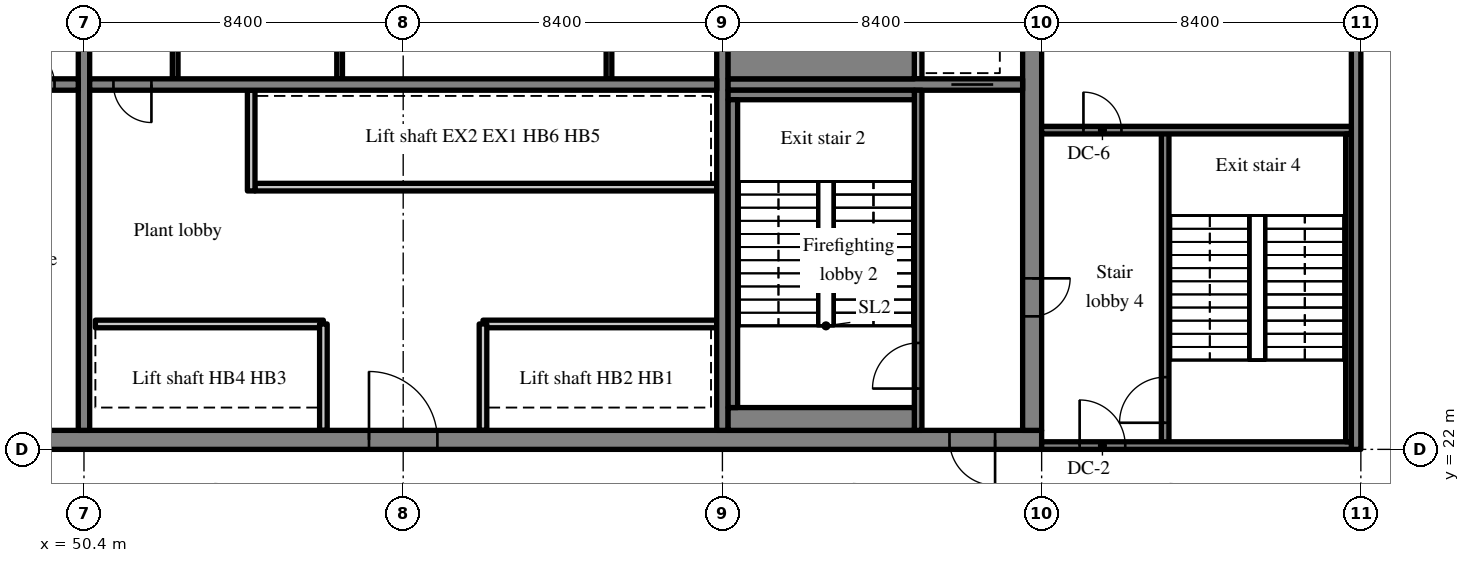
"""IFC4 building model, lengths in metres.
Left out: names, types, materials, properties, quantities, classifications, styles, units other than length and angle.
Written with IfcOpenShell. Run it as: python <this file> out.ifc"""

import sys

from ifc_helpers import new_model, si_unit, direction, frame, frame_2d, origin, place, context, subcontext, project, spatial, rectangle, extrude, source, transform, mapped, element, fill, save


model = new_model("IFC4")
c1 = context("Model", 3, precision=1e-05, world=origin(), true_north=direction((0.0, 1.0)))
c2 = subcontext(c1, "Body", "Model", "MODEL_VIEW")
j1 = project(units=[si_unit("LENGTHUNIT", "METRE"), si_unit("PLANEANGLEUNIT", "RADIAN")], contexts=[c1])
p1 = place(None, origin())
s1 = spatial("IfcSite", under=j1, at=p1, CompositionType="ELEMENT")
p2 = place(p1, origin())
s2 = spatial("IfcBuilding", under=s1, at=p2, CompositionType="ELEMENT")
p3 = place(p2, frame((0.0, 0.0, 270.1)))
s3 = spatial("IfcBuildingStorey", under=s2, at=p3, CompositionType="ELEMENT", Elevation=270.1)
m1 = source(origin(), c2, "Body", "SweptSolid", [
    extrude(rectangle(XDim=50.4, YDim=0.5, at=frame_2d((25.2, 0.0))), origin(), (0.0, 0.0, 1.0), 7.32),
])
p4 = place(p3, frame((25.2, 22.25, 0.0), z_axis=(0.0, 0.0, 1.0), x_axis=(1.0, 0.0, 0.0)))
e1 = element("IfcWall", 1, at=p4, inside=s3, PredefinedType="SHEAR", context=c2, shape_type="MappedRepresentation", body=[
    mapped(m1, transform((0.0, 0.0, 0.0), scale=1.0)),
])
m2 = source(origin(), c2, "Body", "SweptSolid", [
    extrude(rectangle(XDim=1.2, YDim=2.1, at=frame_2d((0.6, 1.05))), frame((0.0, 0.26, 0.0), z_axis=(0.0, -1.0, 0.0), x_axis=(1.0, 0.0, 0.0)), (0.0, 0.0, 1.0), 0.52),
])
p5 = place(p4, frame((22.275, 0.0, 0.0)))
e2 = element("IfcOpeningElement", 2, at=p5, cuts=e1, PredefinedType="OPENING", context=c2, shape_type="MappedRepresentation", body=[
    mapped(m2, transform((0.0, 0.0, 0.0), scale=1.0)),
])
m3 = source(origin(), c2, "Body", "SweptSolid", [
    extrude(rectangle(XDim=0.9, YDim=2.1, at=frame_2d((0.45, 1.05))), frame((0.0, 0.26, 0.0), z_axis=(0.0, -1.0, 0.0), x_axis=(1.0, 0.0, 0.0)), (0.0, 0.0, 1.0), 0.52),
])
p6 = place(p4, frame((15.75, 0.0, 0.0)))
e3 = element("IfcOpeningElement", 3, at=p6, cuts=e1, PredefinedType="OPENING", context=c2, shape_type="MappedRepresentation", body=[
    mapped(m3, transform((0.0, 0.0, 0.0), scale=1.0)),
])
p7 = place(p4, frame((18.75, 0.0, 0.0)))
e4 = element("IfcOpeningElement", 4, at=p7, cuts=e1, PredefinedType="OPENING", context=c2, shape_type="MappedRepresentation", body=[
    mapped(m3, transform((0.0, 0.0, 0.0), scale=1.0)),
])
p8 = place(p4, frame((11.175, 0.0, 0.0)))
e5 = element("IfcOpeningElement", 5, at=p8, cuts=e1, PredefinedType="OPENING", context=c2, shape_type="MappedRepresentation", body=[
    mapped(m3, transform((0.0, 0.0, 0.0), scale=1.0)),
])
m4 = source(origin(), c2, "Body", "SweptSolid", [
    extrude(rectangle(XDim=1.8, YDim=2.1, at=frame_2d((0.9, 1.05))), frame((0.0, 0.26, 0.0), z_axis=(0.0, -1.0, 0.0), x_axis=(1.0, 0.0, 0.0)), (0.0, 0.0, 1.0), 0.52),
])
p9 = place(p4, frame((32.7, 0.0, 0.0)))
e6 = element("IfcOpeningElement", 6, at=p9, cuts=e1, PredefinedType="OPENING", context=c2, shape_type="MappedRepresentation", body=[
    mapped(m4, transform((0.0, 0.0, 0.0), scale=1.0)),
])
p10 = place(p4, frame((6.5, 0.0, 0.0)))
e7 = element("IfcOpeningElement", 7, at=p10, cuts=e1, PredefinedType="OPENING", context=c2, shape_type="MappedRepresentation", body=[
    mapped(m2, transform((0.0, 0.0, 0.0), scale=1.0)),
])
p11 = place(p4, frame((47.975, 0.0, 0.0)))
e8 = element("IfcOpeningElement", 8, at=p11, cuts=e1, PredefinedType="OPENING", context=c2, shape_type="MappedRepresentation", body=[
    mapped(m2, transform((0.0, 0.0, 0.0), scale=1.0)),
])
m5 = source(origin(), c2, "Body", "SweptSolid", [
    extrude(rectangle(XDim=19.0, YDim=0.5, at=frame_2d((9.5, 0.0))), origin(), (0.0, 0.0, 1.0), 7.32),
])
p12 = place(p3, frame((75.35, 22.5, 0.0), z_axis=(0.0, 0.0, 1.0), x_axis=(0.0, 1.0, 0.0)))
e9 = element("IfcWall", 9, at=p12, inside=s3, PredefinedType="SHEAR", context=c2, shape_type="MappedRepresentation", body=[
    mapped(m5, transform((0.0, 0.0, 0.0), scale=1.0)),
])
m6 = source(origin(), c2, "Body", "SweptSolid", [
    extrude(rectangle(XDim=1.0, YDim=2.1, at=frame_2d((0.5, 1.05))), frame((0.0, 0.26, 0.0), z_axis=(0.0, -1.0, 0.0), x_axis=(1.0, 0.0, 0.0)), (0.0, 0.0, 1.0), 0.52),
])
p13 = place(p12, frame((3.0, 0.0, 0.0)))
e10 = element("IfcOpeningElement", 10, at=p13, cuts=e9, PredefinedType="OPENING", context=c2, shape_type="MappedRepresentation", body=[
    mapped(m6, transform((0.0, 0.0, 0.0), scale=1.0)),
])
p14 = place(p12, frame((12.9, 0.0, 0.0)))
e11 = element("IfcOpeningElement", 11, at=p14, cuts=e9, PredefinedType="OPENING", context=c2, shape_type="MappedRepresentation", body=[
    mapped(m2, transform((0.0, 0.0, 0.0), scale=1.0)),
])
m7 = source(origin(), c2, "Body", "SweptSolid", [
    extrude(rectangle(XDim=19.0, YDim=0.3, at=frame_2d((9.5, 0.0))), origin(), (0.0, 0.0, 1.0), 7.32),
])
p15 = place(p3, frame((50.4, 22.5, 0.0), z_axis=(0.0, 0.0, 1.0), x_axis=(0.0, 1.0, 0.0)))
e12 = element("IfcWall", 12, at=p15, inside=s3, PredefinedType="SHEAR", context=c2, shape_type="MappedRepresentation", body=[
    mapped(m7, transform((0.0, 0.0, 0.0), scale=1.0)),
])
m8 = source(origin(), c2, "Body", "SweptSolid", [
    extrude(rectangle(XDim=1.1, YDim=2.1, at=frame_2d((0.55, 1.05))), frame((0.0, 0.16, 0.0), z_axis=(0.0, -1.0, 0.0), x_axis=(1.0, 0.0, 0.0)), (0.0, 0.0, 1.0), 0.32),
])
p16 = place(p15, frame((12.95, 0.0, 0.0)))
e13 = element("IfcOpeningElement", 13, at=p16, cuts=e12, PredefinedType="OPENING", context=c2, shape_type="MappedRepresentation", body=[
    mapped(m8, transform((0.0, 0.0, 0.0), scale=1.0)),
])
p17 = place(p3, frame((67.2, 22.5, 0.0), z_axis=(0.0, 0.0, 1.0), x_axis=(0.0, 1.0, 0.0)))
e14 = element("IfcWall", 14, at=p17, inside=s3, PredefinedType="SHEAR", context=c2, shape_type="MappedRepresentation", body=[
    mapped(m7, transform((0.0, 0.0, 0.0), scale=1.0)),
])
m9 = source(origin(), c2, "Body", "SweptSolid", [
    extrude(rectangle(XDim=16.5, YDim=0.3, at=frame_2d((8.25, 0.0))), origin(), (0.0, 0.0, 1.0), 7.32),
])
p18 = place(p3, frame((33.75, 31.6, 0.0), z_axis=(0.0, 0.0, 1.0), x_axis=(1.0, 0.0, 0.0)))
e15 = element("IfcWall", 15, at=p18, inside=s3, PredefinedType="SHEAR", context=c2, shape_type="MappedRepresentation", body=[
    mapped(m9, transform((0.0, 0.0, 0.0), scale=1.0)),
])
m10 = source(origin(), c2, "Body", "SweptSolid", [
    extrude(rectangle(XDim=1.0, YDim=2.1, at=frame_2d((0.5, 1.05))), frame((0.0, 0.16, 0.0), z_axis=(0.0, -1.0, 0.0), x_axis=(1.0, 0.0, 0.0)), (0.0, 0.0, 1.0), 0.32),
])
p19 = place(p18, frame((14.875, 0.0, 0.0)))
e16 = element("IfcOpeningElement", 16, at=p19, cuts=e15, PredefinedType="OPENING", context=c2, shape_type="MappedRepresentation", body=[
    mapped(m10, transform((0.0, 0.0, 0.0), scale=1.0)),
])
p20 = place(p3, frame((50.55, 31.6, 0.0), z_axis=(0.0, 0.0, 1.0), x_axis=(1.0, 0.0, 0.0)))
e17 = element("IfcWall", 17, at=p20, inside=s3, PredefinedType="SHEAR", context=c2, shape_type="MappedRepresentation", body=[
    mapped(m9, transform((0.0, 0.0, 0.0), scale=1.0)),
])
p21 = place(p20, frame((0.625, 0.0, 0.0)))
e18 = element("IfcOpeningElement", 18, at=p21, cuts=e17, PredefinedType="OPENING", context=c2, shape_type="MappedRepresentation", body=[
    mapped(m10, transform((0.0, 0.0, 0.0), scale=1.0)),
])
m11 = source(origin(), c2, "Body", "SweptSolid", [
    extrude(rectangle(XDim=7.75, YDim=0.3, at=frame_2d((3.875, 0.0))), origin(), (0.0, 0.0, 1.0), 7.32),
])
p22 = place(p3, frame((67.35, 31.6, 0.0), z_axis=(0.0, 0.0, 1.0), x_axis=(1.0, 0.0, 0.0)))
e19 = element("IfcWall", 19, at=p22, inside=s3, PredefinedType="SHEAR", context=c2, shape_type="MappedRepresentation", body=[
    mapped(m11, transform((0.0, 0.0, 0.0), scale=1.0)),
])
p23 = place(p22, frame((5.875, 0.0, 0.0)))
e20 = element("IfcOpeningElement", 20, at=p23, cuts=e19, PredefinedType="OPENING", context=c2, shape_type="MappedRepresentation", body=[
    mapped(m8, transform((0.0, 0.0, 0.0), scale=1.0)),
])
m12 = source(origin(), c2, "Body", "SweptSolid", [
    extrude(rectangle(XDim=18.4, YDim=0.25, at=frame_2d((9.2, 0.0))), origin(), (0.0, 0.0, 1.0), 7.32),
])
p24 = place(p3, frame((83.875, 22.0, 0.0), z_axis=(0.0, 0.0, 1.0), x_axis=(0.0, 1.0, 0.0)))
e21 = element("IfcWall", 21, at=p24, inside=s3, PredefinedType="SHEAR", context=c2, shape_type="MappedRepresentation", body=[
    mapped(m12, transform((0.0, 0.0, 0.0), scale=1.0)),
])
m13 = source(origin(), c2, "Body", "SweptSolid", [
    extrude(rectangle(XDim=6.15, YDim=0.2, at=frame_2d((3.075, 0.0))), origin(), (0.0, 0.0, 1.0), 7.32),
])
p25 = place(p3, frame((67.05, 25.3, 0.0), z_axis=(0.0, 0.0, 1.0), x_axis=(-1.0, 0.0, 0.0)))
e22 = element("IfcWall", 22, at=p25, inside=s3, PredefinedType="SOLIDWALL", context=c2, shape_type="MappedRepresentation", body=[
    mapped(m13, transform((0.0, 0.0, 0.0), scale=1.0)),
])
m14 = source(origin(), c2, "Body", "SweptSolid", [
    extrude(rectangle(XDim=6.0, YDim=0.2, at=frame_2d((3.0, 0.0))), origin(), (0.0, 0.0, 1.0), 7.32),
])
p26 = place(p3, frame((56.7, 25.3, 0.0), z_axis=(0.0, 0.0, 1.0), x_axis=(-1.0, 0.0, 0.0)))
e23 = element("IfcWall", 23, at=p26, inside=s3, PredefinedType="SOLIDWALL", context=c2, shape_type="MappedRepresentation", body=[
    mapped(m14, transform((0.0, 0.0, 0.0), scale=1.0)),
])
m15 = source(origin(), c2, "Body", "SweptSolid", [
    extrude(rectangle(XDim=12.15, YDim=0.2, at=frame_2d((6.075, 0.0))), origin(), (0.0, 0.0, 1.0), 7.32),
])
p27 = place(p3, frame((67.05, 28.9, 0.0), z_axis=(0.0, 0.0, 1.0), x_axis=(-1.0, 0.0, 0.0)))
e24 = element("IfcWall", 24, at=p27, inside=s3, PredefinedType="SOLIDWALL", context=c2, shape_type="MappedRepresentation", body=[
    mapped(m15, transform((0.0, 0.0, 0.0), scale=1.0)),
])
m16 = source(origin(), c2, "Body", "SweptSolid", [
    extrude(rectangle(XDim=2.8, YDim=0.2, at=frame_2d((1.4, 0.0))), origin(), (0.0, 0.0, 1.0), 7.32),
])
for number, where, z_axis, x_axis in (
    (25, (60.9, 22.5, 0.0), (0.0, 0.0, 1.0), (0.0, 1.0, 0.0)),
    (26, (56.7, 22.5, 0.0), (0.0, 0.0, 1.0), (0.0, 1.0, 0.0)),
):
    element("IfcWall", number, at=place(p3, frame(where, z_axis=z_axis, x_axis=x_axis)), inside=s3, PredefinedType="SOLIDWALL", context=c2, shape_type="MappedRepresentation", body=[
        mapped(m16, transform((0.0, 0.0, 0.0), scale=1.0)),
    ])
m17 = source(origin(), c2, "Body", "SweptSolid", [
    extrude(rectangle(XDim=2.65, YDim=0.2, at=frame_2d((1.325, 0.0))), origin(), (0.0, 0.0, 1.0), 7.32),
])
p28 = place(p3, frame((54.8, 28.8, 0.0), z_axis=(0.0, 0.0, 1.0), x_axis=(0.0, 1.0, 0.0)))
e27 = element("IfcWall", 27, at=p28, inside=s3, PredefinedType="SOLIDWALL", context=c2, shape_type="MappedRepresentation", body=[
    mapped(m17, transform((0.0, 0.0, 0.0), scale=1.0)),
])
m18 = source(origin(), c2, "Body", "SweptSolid", [
    extrude(rectangle(XDim=3.25, YDim=0.15, at=frame_2d((1.625, 0.0))), origin(), (0.0, 0.0, 1.0), 7.32),
])
for number, where, z_axis, x_axis in (
    (28, (52.8, 31.75, 0.0), (0.0, 0.0, 1.0), (0.0, 1.0, 0.0)),
    (29, (64.215, 31.75, 0.0), (0.0, 0.0, 1.0), (0.0, 1.0, 0.0)),
    (30, (57.127, 31.75, 0.0), (0.0, 0.0, 1.0), (0.0, 1.0, 0.0)),
):
    element("IfcWall", number, at=place(p3, frame(where, z_axis=z_axis, x_axis=x_axis)), inside=s3, PredefinedType="PARTITIONING", context=c2, shape_type="MappedRepresentation", body=[
        mapped(m18, transform((0.0, 0.0, 0.0), scale=1.0)),
    ])
m19 = source(origin(), c2, "Body", "SweptSolid", [
    extrude(rectangle(XDim=8.95, YDim=0.2, at=frame_2d((4.475, 0.0))), origin(), (0.0, 0.0, 1.0), 7.32),
])
p29 = place(p3, frame((72.35, 22.5, 0.0), z_axis=(0.0, 0.0, 1.0), x_axis=(0.0, 1.0, 0.0)))
e31 = element("IfcWall", 31, at=p29, inside=s3, PredefinedType="SOLIDWALL", context=c2, shape_type="MappedRepresentation", body=[
    mapped(m19, transform((0.0, 0.0, 0.0), scale=1.0)),
])
m20 = source(origin(), c2, "Body", "SweptSolid", [
    extrude(rectangle(XDim=1.2, YDim=2.1, at=frame_2d((0.6, 1.05))), frame((0.0, 0.11, 0.0), z_axis=(0.0, -1.0, 0.0), x_axis=(1.0, 0.0, 0.0)), (0.0, 0.0, 1.0), 0.22),
])
p30 = place(p29, frame((1.1, 0.0, 0.0)))
e32 = element("IfcOpeningElement", 32, at=p30, cuts=e31, PredefinedType="OPENING", context=c2, shape_type="MappedRepresentation", body=[
    mapped(m20, transform((0.0, 0.0, 0.0), scale=1.0)),
])
m21 = source(origin(), c2, "Body", "SweptSolid", [
    extrude(rectangle(XDim=1.85, YDim=0.2, at=frame_2d((0.925, 0.0))), origin(), (0.0, 0.0, 1.0), 7.32),
])
p31 = place(p3, frame((72.35, 31.75, 0.0), z_axis=(0.0, 0.0, 1.0), x_axis=(0.0, 1.0, 0.0)))
e33 = element("IfcWall", 33, at=p31, inside=s3, PredefinedType="SOLIDWALL", context=c2, shape_type="MappedRepresentation", body=[
    mapped(m21, transform((0.0, 0.0, 0.0), scale=1.0)),
])
m22 = source(origin(), c2, "Body", "SweptSolid", [
    extrude(rectangle(XDim=8.3, YDim=0.2, at=frame_2d((4.15, 0.0))), origin(), (0.0, 0.0, 1.0), 7.32),
])
p32 = place(p3, frame((78.85, 22.1, 0.0), z_axis=(0.0, 0.0, 1.0), x_axis=(0.0, 1.0, 0.0)))
e34 = element("IfcWall", 34, at=p32, inside=s3, PredefinedType="SOLIDWALL", context=c2, shape_type="MappedRepresentation", body=[
    mapped(m22, transform((0.0, 0.0, 0.0), scale=1.0)),
])
p33 = place(p32, frame((0.6, 0.0, 0.0)))
e35 = element("IfcOpeningElement", 35, at=p33, cuts=e34, PredefinedType="OPENING", context=c2, shape_type="MappedRepresentation", body=[
    mapped(m20, transform((0.0, 0.0, 0.0), scale=1.0)),
])
m23 = source(origin(), c2, "Body", "SweptSolid", [
    extrude(rectangle(XDim=8.15, YDim=0.2, at=frame_2d((4.075, 0.0))), origin(), (0.0, 0.0, 1.0), 7.32),
])
p34 = place(p3, frame((83.75, 22.1, 0.0), z_axis=(0.0, 0.0, 1.0), x_axis=(-1.0, 0.0, 0.0)))
e36 = element("IfcWall", 36, at=p34, inside=s3, PredefinedType="SOLIDWALL", context=c2, shape_type="MappedRepresentation", body=[
    mapped(m23, transform((0.0, 0.0, 0.0), scale=1.0)),
])
p35 = place(p34, frame((5.95, 0.0, 0.0)))
e37 = element("IfcOpeningElement", 37, at=p35, cuts=e36, PredefinedType="OPENING", context=c2, shape_type="MappedRepresentation", body=[
    mapped(m20, transform((0.0, 0.0, 0.0), scale=1.0)),
])
p36 = place(p3, frame((83.75, 30.4, 0.0), z_axis=(0.0, 0.0, 1.0), x_axis=(-1.0, 0.0, 0.0)))
e38 = element("IfcWall", 38, at=p36, inside=s3, PredefinedType="SOLIDWALL", context=c2, shape_type="MappedRepresentation", body=[
    mapped(m23, transform((0.0, 0.0, 0.0), scale=1.0)),
])
m24 = source(origin(), c2, "Body", "SweptSolid", [
    extrude(rectangle(XDim=1.0, YDim=2.1, at=frame_2d((0.5, 1.05))), frame((0.0, 0.11, 0.0), z_axis=(0.0, -1.0, 0.0), x_axis=(1.0, 0.0, 0.0)), (0.0, 0.0, 1.0), 0.22),
])
p37 = place(p36, frame((6.05, 0.0, 0.0)))
e39 = element("IfcOpeningElement", 39, at=p37, cuts=e38, PredefinedType="OPENING", context=c2, shape_type="MappedRepresentation", body=[
    mapped(m24, transform((0.0, 0.0, 0.0), scale=1.0)),
])
m25 = source(origin(), c2, "Body", "SweptSolid", [
    extrude(rectangle(XDim=4.9, YDim=0.6, at=frame_2d((2.45, 0.0))), origin(), (0.0, 0.0, 1.0), 7.32),
])
p38 = place(p3, frame((67.35, 22.8, 0.0), z_axis=(0.0, 0.0, 1.0), x_axis=(1.0, 0.0, 0.0)))
e40 = element("IfcWall", 40, at=p38, inside=s3, PredefinedType="SOLIDWALL", context=c2, shape_type="MappedRepresentation", body=[
    mapped(m25, transform((0.0, 0.0, 0.0), scale=1.0)),
])
m26 = source(origin(), c2, "Body", "SweptSolid", [
    extrude(rectangle(XDim=4.9, YDim=0.25, at=frame_2d((2.45, 0.0))), origin(), (0.0, 0.0, 1.0), 7.32),
])
p39 = place(p3, frame((67.35, 31.325, 0.0), z_axis=(0.0, 0.0, 1.0), x_axis=(1.0, 0.0, 0.0)))
e41 = element("IfcWall", 41, at=p39, inside=s3, PredefinedType="SOLIDWALL", context=c2, shape_type="MappedRepresentation", body=[
    mapped(m26, transform((0.0, 0.0, 0.0), scale=1.0)),
])
m27 = source(origin(), c2, "Body", "SweptSolid", [
    extrude(rectangle(XDim=8.1, YDim=0.25, at=frame_2d((4.05, 0.0))), origin(), (0.0, 0.0, 1.0), 7.32),
])
p40 = place(p3, frame((67.475, 23.1, 0.0), z_axis=(0.0, 0.0, 1.0), x_axis=(0.0, 1.0, 0.0)))
e42 = element("IfcWall", 42, at=p40, inside=s3, PredefinedType="SOLIDWALL", context=c2, shape_type="MappedRepresentation", body=[
    mapped(m27, transform((0.0, 0.0, 0.0), scale=1.0)),
])
m28 = source(origin(), c2, "Body", "SweptSolid", [
    extrude(rectangle(XDim=4.9, YDim=1.05, at=frame_2d((2.45, 0.0))), origin(), (0.0, 0.0, 1.0), 7.32),
])
p41 = place(p3, frame((67.35, 32.275, 0.0), z_axis=(0.0, 0.0, 1.0), x_axis=(1.0, 0.0, 0.0)))
e43 = element("IfcWall", 43, at=p41, inside=s3, PredefinedType="SOLIDWALL", context=c2, shape_type="MappedRepresentation", body=[
    mapped(m28, transform((0.0, 0.0, 0.0), scale=1.0)),
])
m29 = source(origin(), c2, "Body", "SweptSolid", [
    extrude(rectangle(XDim=8.1, YDim=0.15, at=frame_2d((4.05, 0.0))), origin(), (0.0, 0.0, 1.0), 7.32),
])
p42 = place(p3, frame((83.675, 22.2, 0.0), z_axis=(0.0, 0.0, 1.0), x_axis=(0.0, 1.0, 0.0)))
e44 = element("IfcWall", 44, at=p42, inside=s3, PredefinedType="SOLIDWALL", context=c2, shape_type="MappedRepresentation", body=[
    mapped(m29, transform((0.0, 0.0, 0.0), scale=1.0)),
])
m30 = source(origin(), c2, "Body", "SweptSolid", [
    extrude(rectangle(XDim=1.0, YDim=2.1, at=frame_2d((0.5, 1.05))), frame((0.0, 0.025, 0.0), z_axis=(0.0, -1.0, 0.0), x_axis=(1.0, 0.0, 0.0)), (0.0, 0.0, 1.0), 0.05),
])
p43 = place(p19, origin())
e45 = element("IfcDoor", 45, at=p43, inside=s3, OperationType="SINGLE_SWING_LEFT", PredefinedType="DOOR", context=c2, shape_type="MappedRepresentation", body=[
    mapped(m30, transform((0.0, 0.0, 0.0), scale=1.0)),
])
fill(e16, e45)
m31 = source(origin(), c2, "Body", "SweptSolid", [
    extrude(rectangle(XDim=1.8, YDim=2.1, at=frame_2d((0.9, 1.05))), frame((0.0, 0.175, 0.0), z_axis=(0.0, -1.0, 0.0), x_axis=(1.0, 0.0, 0.0)), (0.0, 0.0, 1.0), 0.05),
])
p44 = place(p9, origin())
e46 = element("IfcDoor", 46, at=p44, inside=s3, OperationType="DOUBLE_DOOR_SINGLE_SWING", PredefinedType="DOOR", context=c2, shape_type="MappedRepresentation", body=[
    mapped(m31, transform((0.0, 0.0, 0.0), scale=1.0)),
])
fill(e6, e46)
p45 = place(p21, origin())
e47 = element("IfcDoor", 47, at=p45, inside=s3, OperationType="SINGLE_SWING_RIGHT", PredefinedType="DOOR", context=c2, shape_type="MappedRepresentation", body=[
    mapped(m30, transform((0.0, 0.0, 0.0), scale=1.0)),
])
fill(e18, e47)
m32 = source(origin(), c2, "Body", "SweptSolid", [
    extrude(rectangle(XDim=1.2, YDim=2.1, at=frame_2d((0.6, 1.05))), frame((0.0, 0.025, 0.0), z_axis=(0.0, -1.0, 0.0), x_axis=(1.0, 0.0, 0.0)), (0.0, 0.0, 1.0), 0.05),
])
p46 = place(p30, origin())
e48 = element("IfcDoor", 48, at=p46, inside=s3, OperationType="SINGLE_SWING_LEFT", PredefinedType="DOOR", context=c2, shape_type="MappedRepresentation", body=[
    mapped(m32, transform((0.0, 0.0, 0.0), scale=1.0)),
])
fill(e32, e48)
m33 = source(origin(), c2, "Body", "SweptSolid", [
    extrude(rectangle(XDim=1.2, YDim=2.1, at=frame_2d((0.6, 1.05))), frame((0.0, 0.175, 0.0), z_axis=(0.0, -1.0, 0.0), x_axis=(1.0, 0.0, 0.0)), (0.0, 0.0, 1.0), 0.05),
])
p47 = place(p11, origin())
e49 = element("IfcDoor", 49, at=p47, inside=s3, OperationType="SINGLE_SWING_RIGHT", PredefinedType="DOOR", context=c2, shape_type="MappedRepresentation", body=[
    mapped(m33, transform((0.0, 0.0, 0.0), scale=1.0)),
])
fill(e8, e49)
m34 = source(origin(), c2, "Body", "SweptSolid", [
    extrude(rectangle(XDim=1.1, YDim=2.1, at=frame_2d((0.55, 1.05))), frame((0.0, 0.025, 0.0), z_axis=(0.0, -1.0, 0.0), x_axis=(1.0, 0.0, 0.0)), (0.0, 0.0, 1.0), 0.05),
])
p48 = place(p23, origin())
e50 = element("IfcDoor", 50, at=p48, inside=s3, OperationType="SLIDING_TO_LEFT", PredefinedType="DOOR", context=c2, shape_type="MappedRepresentation", body=[
    mapped(m34, transform((0.0, 0.0, 0.0), scale=1.0)),
])
fill(e20, e50)
p49 = place(p13, origin())
e51 = element("IfcDoor", 51, at=p49, inside=s3, OperationType="SINGLE_SWING_RIGHT", PredefinedType="DOOR", context=c2, shape_type="MappedRepresentation", body=[
    mapped(m30, transform((0.0, 0.0, 0.0), scale=1.0)),
])
fill(e10, e51)
p50 = place(p33, origin())
e52 = element("IfcDoor", 52, at=p50, inside=s3, OperationType="SINGLE_SWING_LEFT", PredefinedType="DOOR", context=c2, shape_type="MappedRepresentation", body=[
    mapped(m32, transform((0.0, 0.0, 0.0), scale=1.0)),
])
fill(e35, e52)
p51 = place(p35, origin())
e53 = element("IfcDoor", 53, at=p51, inside=s3, OperationType="SINGLE_SWING_RIGHT", PredefinedType="DOOR", context=c2, shape_type="MappedRepresentation", body=[
    mapped(m32, transform((0.0, 0.0, 0.0), scale=1.0)),
])
fill(e37, e53)
p52 = place(p37, origin())
e54 = element("IfcDoor", 54, at=p52, inside=s3, OperationType="SINGLE_SWING_RIGHT", PredefinedType="DOOR", context=c2, shape_type="MappedRepresentation", body=[
    mapped(m30, transform((0.0, 0.0, 0.0), scale=1.0)),
])
fill(e39, e54)
save(model, sys.argv[1])
